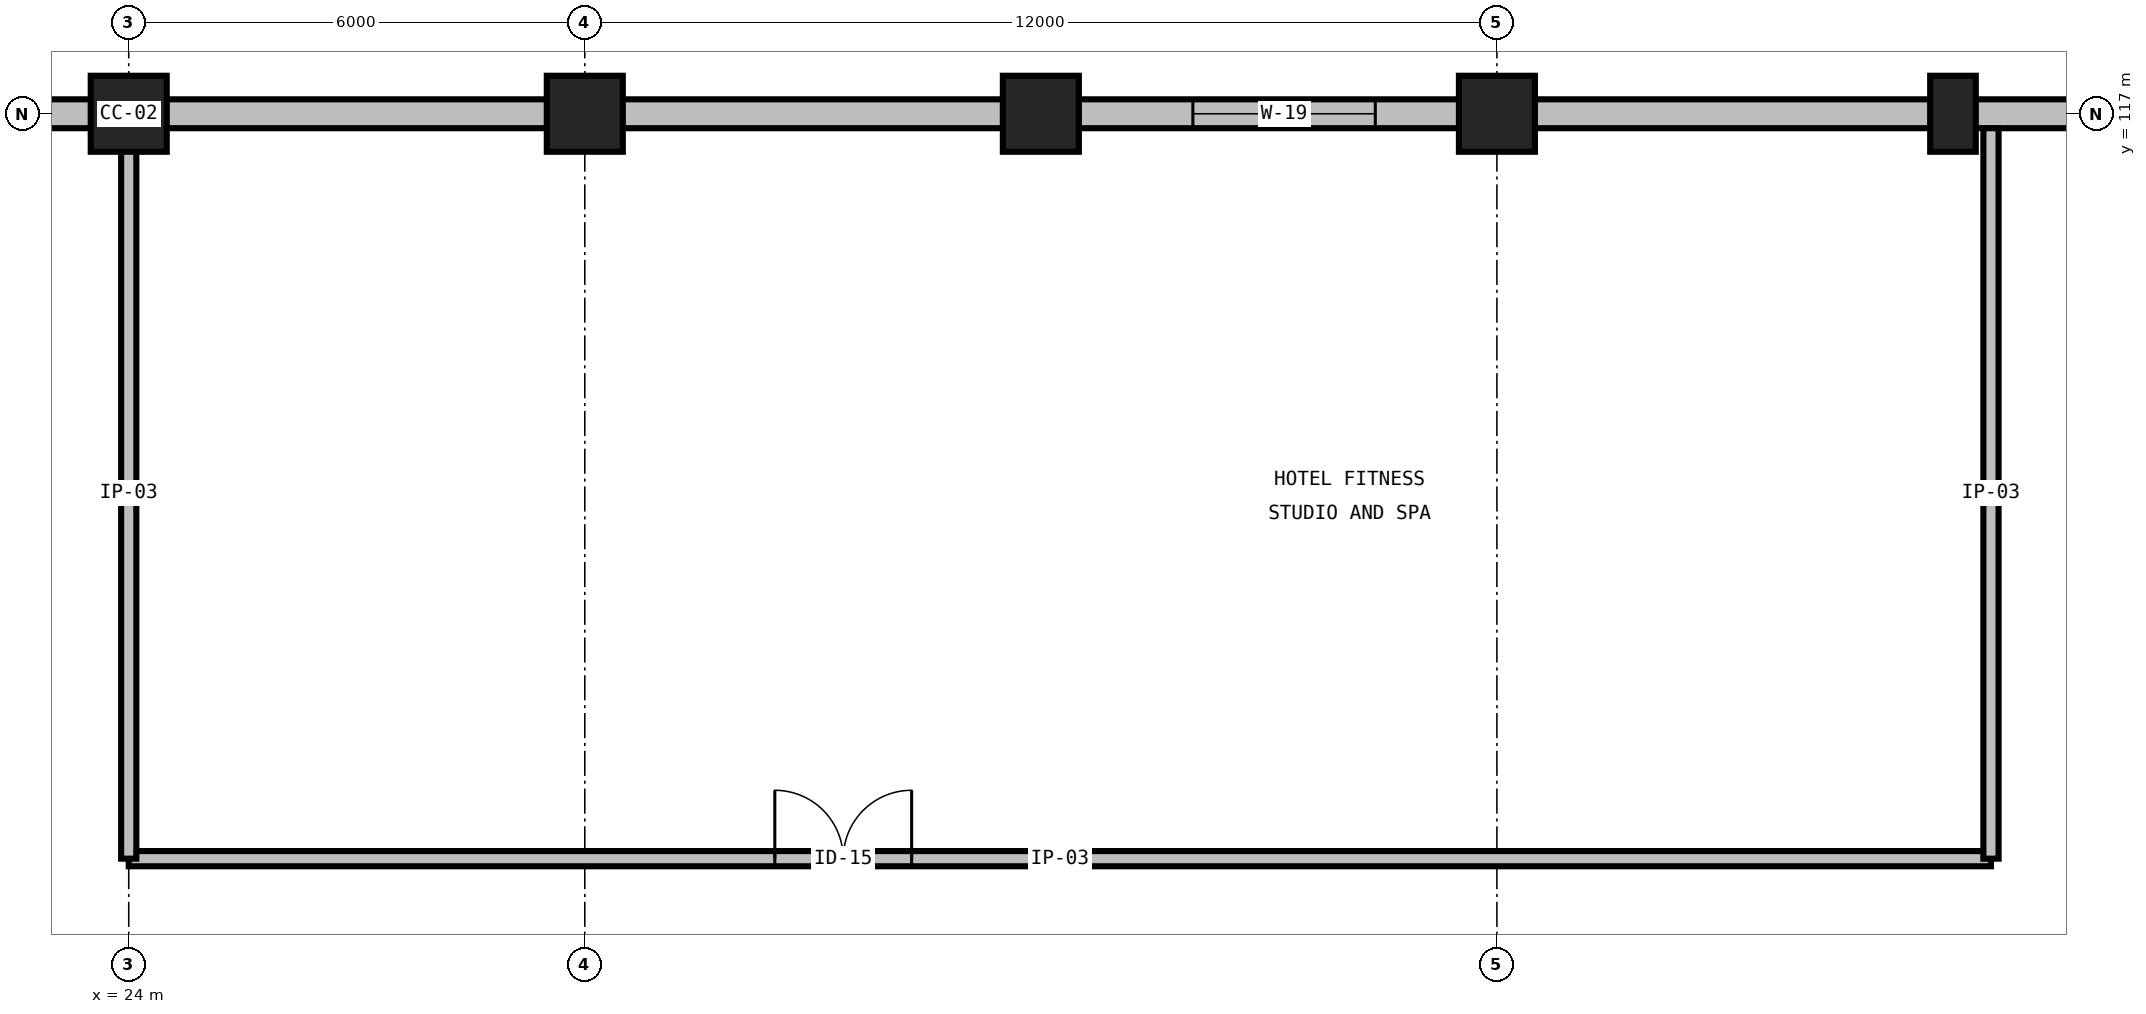
"""IFC4 building model, lengths in metres.
Left out: names, types, materials, properties, quantities, classifications, styles, units other than length and angle.
Written with IfcOpenShell. Run it as: python <this file> out.ifc"""

import sys

from ifc_helpers import new_model, si_unit, direction, frame, frame_2d, origin, origin_2d, place, context, subcontext, project, spatial, rectangle, extrude, element, fill, save


model = new_model("IFC4")
c1 = context("Model", 3, precision=1e-05, world=origin(), true_north=direction((0.0, 1.0)))
c2 = subcontext(c1, "Body", "Model", "MODEL_VIEW")
j1 = project(units=[si_unit("LENGTHUNIT", "METRE"), si_unit("PLANEANGLEUNIT", "RADIAN")], contexts=[c1])
p1 = place(None, origin())
s1 = spatial("IfcSite", under=j1, at=p1, CompositionType="ELEMENT")
p2 = place(p1, origin())
s2 = spatial("IfcBuilding", under=s1, at=p2, CompositionType="ELEMENT")
p3 = place(p2, frame((0.0, 0.0, 12.0)))
s3 = spatial("IfcBuildingStorey", under=s2, at=p3, CompositionType="ELEMENT", Elevation=12.0)
for number, where, z_axis, x_axis in (
    (1, (24.0, 117.0, 0.0), (0.0, 0.0, 1.0), (1.0, 0.0, 0.0)),
    (2, (30.0, 117.0, 0.0), (0.0, 0.0, 1.0), (1.0, 0.0, 0.0)),
    (3, (36.0, 117.0, 0.0), (0.0, 0.0, 1.0), (1.0, 0.0, 0.0)),
    (4, (42.0, 117.0, 0.0), (0.0, 0.0, 1.0), (1.0, 0.0, 0.0)),
):
    element("IfcColumn", number, at=place(p3, frame(where, z_axis=z_axis, x_axis=x_axis)), inside=s3, PredefinedType="COLUMN", context=c2, shape_type="SweptSolid", body=[
        extrude(rectangle(XDim=1.0, YDim=1.0, at=origin_2d()), origin(), (0.0, 0.0, 1.0), 6.0),
    ])
p4 = place(p3, frame((48.0, 117.0, 0.0), z_axis=(0.0, 0.0, 1.0), x_axis=(1.0, 0.0, 0.0)))
e5 = element("IfcColumn", 5, at=p4, inside=s3, PredefinedType="PILASTER", context=c2, shape_type="SweptSolid", body=[
    extrude(rectangle(XDim=0.6, YDim=1.0, at=origin_2d()), origin(), (0.0, 0.0, 1.0), 6.0),
])
p5 = place(p3, frame((24.0, 117.0, 0.0), z_axis=(0.0, 0.0, 1.0), x_axis=(-1.0, 0.0, 0.0)))
e6 = element("IfcWall", 6, at=p5, inside=s3, PredefinedType="STANDARD", context=c2, shape_type="SweptSolid", body=[
    extrude(rectangle(XDim=12.0, YDim=0.38, at=frame_2d((6.0, 0.0))), origin(), (0.0, 0.0, 1.0), 4.746),
])
p6 = place(p5, frame((1.6, 0.0, 0.9)))
e7 = element("IfcOpeningElement", 7, at=p6, cuts=e6, PredefinedType="OPENING", context=c2, shape_type="SweptSolid", body=[
    extrude(rectangle(XDim=2.4, YDim=2.15, at=frame_2d((1.2, 1.075))), frame((0.0, 0.205, 0.0), z_axis=(0.0, -1.0, 0.0), x_axis=(1.0, 0.0, 0.0)), (0.0, 0.0, 1.0), 0.41),
])
p7 = place(p3, frame((30.0, 117.0, 0.0), z_axis=(0.0, 0.0, 1.0), x_axis=(-1.0, 0.0, 0.0)))
e8 = element("IfcWall", 8, at=p7, inside=s3, PredefinedType="STANDARD", context=c2, shape_type="SweptSolid", body=[
    extrude(rectangle(XDim=6.0, YDim=0.38, at=frame_2d((3.0, 0.0))), origin(), (0.0, 0.0, 1.0), 4.746),
])
p8 = place(p3, frame((42.0, 117.0, 0.0), z_axis=(0.0, 0.0, 1.0), x_axis=(-1.0, 0.0, 0.0)))
e9 = element("IfcWall", 9, at=p8, inside=s3, PredefinedType="STANDARD", context=c2, shape_type="SweptSolid", body=[
    extrude(rectangle(XDim=12.0, YDim=0.38, at=frame_2d((6.0, 0.0))), origin(), (0.0, 0.0, 1.0), 4.746),
])
p9 = place(p8, frame((1.6, 0.0, 0.9)))
e10 = element("IfcOpeningElement", 10, at=p9, cuts=e9, PredefinedType="OPENING", context=c2, shape_type="SweptSolid", body=[
    extrude(rectangle(XDim=2.4, YDim=2.15, at=frame_2d((1.2, 1.075))), frame((0.0, 0.205, 0.0), z_axis=(0.0, -1.0, 0.0), x_axis=(1.0, 0.0, 0.0)), (0.0, 0.0, 1.0), 0.41),
])
p10 = place(p3, frame((54.0, 117.0, 0.0), z_axis=(0.0, 0.0, 1.0), x_axis=(-1.0, 0.0, 0.0)))
e11 = element("IfcWall", 11, at=p10, inside=s3, PredefinedType="STANDARD", context=c2, shape_type="SweptSolid", body=[
    extrude(rectangle(XDim=12.0, YDim=0.38, at=frame_2d((6.0, 0.0))), origin(), (0.0, 0.0, 1.0), 4.746),
])
p11 = place(p3, frame((24.0, 107.2, 0.0), z_axis=(0.0, 0.0, 1.0), x_axis=(1.0, 0.0, 0.0)))
e12 = element("IfcWall", 12, at=p11, inside=s3, PredefinedType="PARTITIONING", context=c2, shape_type="SweptSolid", body=[
    extrude(rectangle(XDim=24.5, YDim=0.2, at=frame_2d((12.25, 0.0))), origin(), (0.0, 0.0, 1.0), 5.65),
])
p12 = place(p11, frame((8.5, 0.0, 0.0)))
e13 = element("IfcOpeningElement", 13, at=p12, cuts=e12, PredefinedType="OPENING", context=c2, shape_type="SweptSolid", body=[
    extrude(rectangle(XDim=1.8, YDim=2.3, at=frame_2d((0.9, 1.15))), frame((0.0, 0.115, 0.0), z_axis=(0.0, -1.0, 0.0), x_axis=(1.0, 0.0, 0.0)), (0.0, 0.0, 1.0), 0.23),
])
p13 = place(p3, frame((48.5, 107.2, 0.0), z_axis=(0.0, 0.0, 1.0), x_axis=(0.0, 1.0, 0.0)))
e14 = element("IfcWall", 14, at=p13, inside=s3, PredefinedType="PARTITIONING", context=c2, shape_type="SweptSolid", body=[
    extrude(rectangle(XDim=9.61, YDim=0.2, at=frame_2d((4.805, 0.0))), origin(), (0.0, 0.0, 1.0), 5.65),
])
p14 = place(p3, frame((24.0, 116.81, 0.0), z_axis=(0.0, 0.0, 1.0), x_axis=(0.0, -1.0, 0.0)))
e15 = element("IfcWall", 15, at=p14, inside=s3, PredefinedType="PARTITIONING", context=c2, shape_type="SweptSolid", body=[
    extrude(rectangle(XDim=9.61, YDim=0.2, at=frame_2d((4.805, 0.0))), origin(), (0.0, 0.0, 1.0), 4.8),
])
p15 = place(p9, origin())
e16 = element("IfcWindow", 16, at=p15, inside=s3, PartitioningType="DOUBLE_PANEL_VERTICAL", PredefinedType="WINDOW", context=c2, shape_type="SweptSolid", body=[
    extrude(rectangle(XDim=2.4, YDim=2.15, at=frame_2d((1.2, 1.075))), frame((0.0, 0.03, 0.0), z_axis=(0.0, -1.0, 0.0), x_axis=(1.0, 0.0, 0.0)), (0.0, 0.0, 1.0), 0.06),
])
fill(e10, e16)
p16 = place(p12, origin())
e17 = element("IfcDoor", 17, at=p16, inside=s3, OperationType="DOUBLE_DOOR_SINGLE_SWING", PredefinedType="DOOR", context=c2, shape_type="SweptSolid", body=[
    extrude(rectangle(XDim=1.8, YDim=2.3, at=frame_2d((0.9, 1.15))), frame((0.0, 0.025, 0.0), z_axis=(0.0, -1.0, 0.0), x_axis=(1.0, 0.0, 0.0)), (0.0, 0.0, 1.0), 0.05),
])
fill(e13, e17)
save(model, sys.argv[1])
